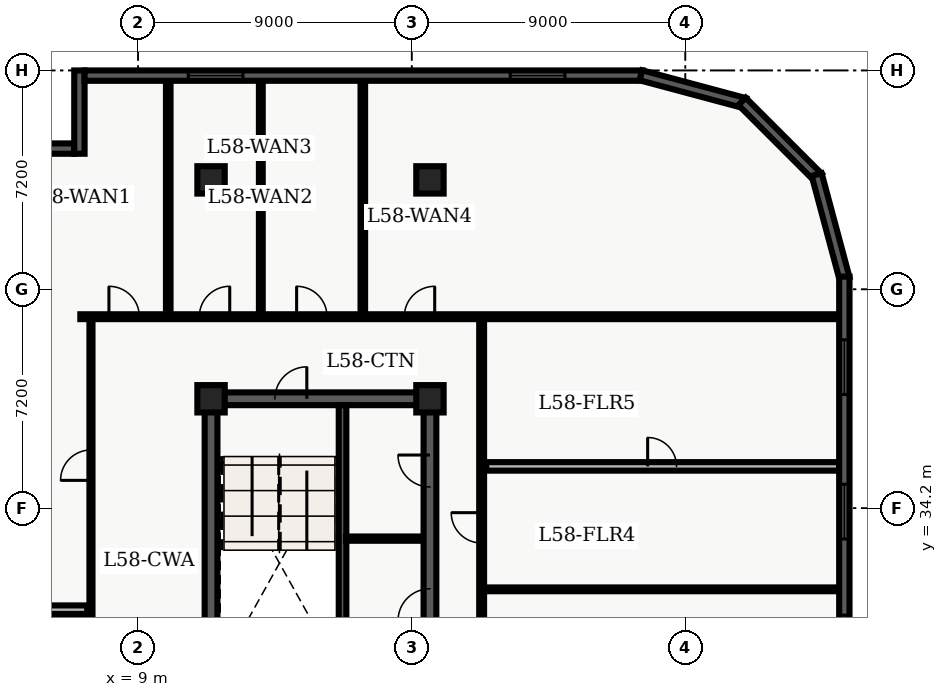
"""IFC4 building model, lengths in metres.
Left out: names, types, materials, properties, quantities, classifications, styles, units other than length and angle.
Written with IfcOpenShell. Run it as: python <this file> out.ifc"""

import sys

from ifc_helpers import new_model, entity, si_unit, converted_unit, direction, frame, origin_with_axes, origin_2d_with_axis, place, context, subcontext, project, spatial, polyline, rectangle, outline, extrude, element, fill, save


model = new_model("IFC4")
c1 = context("Model", 3, precision=1e-05, world=origin_with_axes(), true_north=direction((0.0, 1.0)))
c2 = subcontext(c1, "Body", "Model", "MODEL_VIEW")
j1 = project(units=[si_unit("LENGTHUNIT", "METRE"), converted_unit("PLANEANGLEUNIT", "DEGREE", entity("IfcPlaneAngleMeasure", 0.017), si_unit("PLANEANGLEUNIT", "RADIAN"), dimensions=[0, 0, 0, 0, 0, 0, 0])], contexts=[c1])
p1 = place(None, origin_with_axes())
s1 = spatial("IfcSite", under=j1, at=p1, CompositionType="ELEMENT")
p2 = place(p1, origin_with_axes())
s2 = spatial("IfcBuilding", under=s1, at=p2, CompositionType="ELEMENT")
p3 = place(p2, frame((0.0, 0.0, 236.4), z_axis=(0.0, 0.0, 1.0), x_axis=(1.0, 0.0, 0.0)))
s3 = spatial("IfcBuildingStorey", under=s2, at=p3, CompositionType="ELEMENT", Elevation=236.4)
p4 = place(p3, frame((11.4, 10.8, 0.0), z_axis=(0.0, 0.0, 1.0), x_axis=(0.0, 1.0, 0.0)))
e1 = element("IfcWall", 1, at=p4, inside=s3, PredefinedType="SHEAR", context=c2, shape_type="SweptSolid", body=[
    extrude(outline(polyline([(0.0, -0.21), (27.0, -0.21), (27.0, 0.21), (0.0, 0.21), (0.0, -0.21)])), origin_with_axes(), (0.0, 0.0, 1.0), 3.66),
])
p5 = place(p3, frame((11.4, 37.8, 0.0), z_axis=(0.0, 0.0, 1.0), x_axis=(1.0, 0.0, 0.0)))
e2 = element("IfcWall", 2, at=p5, inside=s3, PredefinedType="SHEAR", context=c2, shape_type="SweptSolid", body=[
    extrude(outline(polyline([(0.0, -0.21), (7.2, -0.21), (7.2, 0.21), (0.0, 0.21), (0.0, -0.21)])), origin_with_axes(), (0.0, 0.0, 1.0), 3.66),
])
p6 = place(p5, frame((2.625, 0.0, 0.0), z_axis=(0.0, 0.0, 1.0), x_axis=(1.0, 0.0, 0.0)))
e3 = element("IfcOpeningElement", 3, at=p6, cuts=e2, PredefinedType="OPENING", context=c2, shape_type="SweptSolid", body=[
    extrude(rectangle(XDim=1.05, YDim=0.44, at=origin_2d_with_axis()), origin_with_axes(), (0.0, 0.0, 1.0), 2.15),
])
p7 = place(p3, frame((18.6, 24.3, 0.0), z_axis=(0.0, 0.0, 1.0), x_axis=(0.0, 1.0, 0.0)))
e4 = element("IfcWall", 4, at=p7, inside=s3, PredefinedType="SHEAR", context=c2, shape_type="SweptSolid", body=[
    extrude(outline(polyline([(0.0, -0.21), (13.5, -0.21), (13.5, 0.21), (0.0, 0.21), (0.0, -0.21)])), origin_with_axes(), (0.0, 0.0, 1.0), 3.66),
])
p8 = place(p7, frame((6.725, 0.0, 0.0), z_axis=(0.0, 0.0, 1.0), x_axis=(1.0, 0.0, 0.0)))
e5 = element("IfcOpeningElement", 5, at=p8, cuts=e4, PredefinedType="OPENING", context=c2, shape_type="SweptSolid", body=[
    extrude(rectangle(XDim=1.05, YDim=0.44, at=origin_2d_with_axis()), origin_with_axes(), (0.0, 0.0, 1.0), 2.15),
])
p9 = place(p7, frame((11.125, 0.0, 0.0), z_axis=(0.0, 0.0, 1.0), x_axis=(1.0, 0.0, 0.0)))
e6 = element("IfcOpeningElement", 6, at=p9, cuts=e4, PredefinedType="OPENING", context=c2, shape_type="SweptSolid", body=[
    extrude(rectangle(XDim=1.05, YDim=0.44, at=origin_2d_with_axis()), origin_with_axes(), (0.0, 0.0, 1.0), 2.15),
])
p10 = place(p3, frame((15.725, 28.9, 0.0), z_axis=(0.0, 0.0, 1.0), x_axis=(0.0, 1.0, 0.0)))
e7 = element("IfcWall", 7, at=p10, inside=s3, PredefinedType="SHEAR", context=c2, shape_type="SweptSolid", body=[
    extrude(outline(polyline([(0.0, -0.125), (8.69, -0.125), (8.69, 0.125), (0.0, 0.125), (0.0, -0.125)])), origin_with_axes(), (0.0, 0.0, 1.0), 3.66),
])
for number, where, z_axis, x_axis in (
    (8, (11.4, 37.8, 0.0), (0.0, 0.0, 1.0), (1.0, 0.0, 0.0)),
    (9, (11.4, 45.0, 0.0), (0.0, 0.0, 1.0), (1.0, 0.0, 0.0)),
    (10, (18.6, 37.8, 0.0), (0.0, 0.0, 1.0), (1.0, 0.0, 0.0)),
    (11, (18.6, 45.0, 0.0), (0.0, 0.0, 1.0), (1.0, 0.0, 0.0)),
):
    element("IfcColumn", number, at=place(p3, frame(where, z_axis=z_axis, x_axis=x_axis)), inside=s3, PredefinedType="COLUMN", context=c2, shape_type="SweptSolid", body=[
        extrude(rectangle(XDim=0.9, YDim=0.9, at=origin_2d_with_axis()), origin_with_axes(), (0.0, 0.0, 1.0), 3.9),
    ])
p11 = place(p3, frame((15.84, 33.2, 0.0), z_axis=(0.0, 0.0, 1.0), x_axis=(1.0, 0.0, 0.0)))
e12 = element("IfcWall", 12, at=p11, inside=s3, PredefinedType="PARTITIONING", context=c2, shape_type="SweptSolid", body=[
    extrude(outline(polyline([(0.0, -0.07), (2.46, -0.07), (2.46, 0.07), (0.0, 0.07), (0.0, -0.07)])), origin_with_axes(), (0.0, 0.0, 1.0), 2.7),
])
p12 = place(p3, frame((7.1, 40.5, 0.0), z_axis=(0.0, 0.0, 1.0), x_axis=(1.0, 0.0, 0.0)))
e13 = element("IfcWall", 13, at=p12, inside=s3, PredefinedType="PARTITIONING", context=c2, shape_type="SweptSolid", body=[
    extrude(outline(polyline([(0.0, -0.08), (24.965, -0.08), (24.965, 0.08), (0.0, 0.08), (0.0, -0.08)])), origin_with_axes(), (0.0, 0.0, 1.0), 2.7),
])
p13 = place(p12, frame((1.441, 0.0, 0.0), z_axis=(0.0, 0.0, 1.0), x_axis=(1.0, 0.0, 0.0)))
e14 = element("IfcOpeningElement", 14, at=p13, cuts=e13, PredefinedType="OPENING", context=c2, shape_type="SweptSolid", body=[
    extrude(rectangle(XDim=1.0, YDim=0.18, at=origin_2d_with_axis()), origin_with_axes(), (0.0, 0.0, 1.0), 2.15),
])
p14 = place(p12, frame((4.415, 0.0, 0.0), z_axis=(0.0, 0.0, 1.0), x_axis=(1.0, 0.0, 0.0)))
e15 = element("IfcOpeningElement", 15, at=p14, cuts=e13, PredefinedType="OPENING", context=c2, shape_type="SweptSolid", body=[
    extrude(rectangle(XDim=1.0, YDim=0.18, at=origin_2d_with_axis()), origin_with_axes(), (0.0, 0.0, 1.0), 2.15),
])
p15 = place(p12, frame((7.614, 0.0, 0.0), z_axis=(0.0, 0.0, 1.0), x_axis=(1.0, 0.0, 0.0)))
e16 = element("IfcOpeningElement", 16, at=p15, cuts=e13, PredefinedType="OPENING", context=c2, shape_type="SweptSolid", body=[
    extrude(rectangle(XDim=1.0, YDim=0.18, at=origin_2d_with_axis()), origin_with_axes(), (0.0, 0.0, 1.0), 2.15),
])
p16 = place(p12, frame((11.156, 0.0, 0.0), z_axis=(0.0, 0.0, 1.0), x_axis=(1.0, 0.0, 0.0)))
e17 = element("IfcOpeningElement", 17, at=p16, cuts=e13, PredefinedType="OPENING", context=c2, shape_type="SweptSolid", body=[
    extrude(rectangle(XDim=1.0, YDim=0.18, at=origin_2d_with_axis()), origin_with_axes(), (0.0, 0.0, 1.0), 2.15),
])
p17 = place(p3, frame((20.3, 7.8, 0.0), z_axis=(0.0, 0.0, 1.0), x_axis=(0.0, 1.0, 0.0)))
e18 = element("IfcWall", 18, at=p17, inside=s3, PredefinedType="PARTITIONING", context=c2, shape_type="SweptSolid", body=[
    extrude(outline(polyline([(0.0, -0.08), (32.7, -0.08), (32.7, 0.08), (0.0, 0.08), (0.0, -0.08)])), origin_with_axes(), (0.0, 0.0, 1.0), 2.7),
])
p18 = place(p17, frame((14.556, 0.0, 0.0), z_axis=(0.0, 0.0, 1.0), x_axis=(1.0, 0.0, 0.0)))
e19 = element("IfcOpeningElement", 19, at=p18, cuts=e18, PredefinedType="OPENING", context=c2, shape_type="SweptSolid", body=[
    extrude(rectangle(XDim=0.9, YDim=0.18, at=origin_2d_with_axis()), origin_with_axes(), (0.0, 0.0, 1.0), 2.15),
])
p19 = place(p17, frame((18.551, 0.0, 0.0), z_axis=(0.0, 0.0, 1.0), x_axis=(1.0, 0.0, 0.0)))
e20 = element("IfcOpeningElement", 20, at=p19, cuts=e18, PredefinedType="OPENING", context=c2, shape_type="SweptSolid", body=[
    extrude(rectangle(XDim=1.0, YDim=0.18, at=origin_2d_with_axis()), origin_with_axes(), (0.0, 0.0, 1.0), 2.15),
])
p20 = place(p17, frame((22.226, 0.0, 0.0), z_axis=(0.0, 0.0, 1.0), x_axis=(1.0, 0.0, 0.0)))
e21 = element("IfcOpeningElement", 21, at=p20, cuts=e18, PredefinedType="OPENING", context=c2, shape_type="SweptSolid", body=[
    extrude(rectangle(XDim=1.0, YDim=0.18, at=origin_2d_with_axis()), origin_with_axes(), (0.0, 0.0, 1.0), 2.15),
])
p21 = place(p17, frame((25.754, 0.0, 0.0), z_axis=(0.0, 0.0, 1.0), x_axis=(1.0, 0.0, 0.0)))
e22 = element("IfcOpeningElement", 22, at=p21, cuts=e18, PredefinedType="OPENING", context=c2, shape_type="SweptSolid", body=[
    extrude(rectangle(XDim=1.0, YDim=0.18, at=origin_2d_with_axis()), origin_with_axes(), (0.0, 0.0, 1.0), 2.15),
])
p22 = place(p17, frame((5.775, 0.0, 0.0), z_axis=(0.0, 0.0, 1.0), x_axis=(1.0, 0.0, 0.0)))
e23 = element("IfcOpeningElement", 23, at=p22, cuts=e18, PredefinedType="OPENING", context=c2, shape_type="SweptSolid", body=[
    extrude(rectangle(XDim=1.05, YDim=0.18, at=origin_2d_with_axis()), origin_with_axes(), (0.0, 0.0, 1.0), 2.15),
])
p23 = place(p3, frame((7.45, 7.8, 0.0), z_axis=(0.0, 0.0, 1.0), x_axis=(0.0, 1.0, 0.0)))
e24 = element("IfcWall", 24, at=p23, inside=s3, PredefinedType="PARTITIONING", context=c2, shape_type="SweptSolid", body=[
    extrude(outline(polyline([(0.0, -0.05), (32.7, -0.05), (32.7, 0.05), (0.0, 0.05), (0.0, -0.05)])), origin_with_axes(), (0.0, 0.0, 1.0), 2.7),
])
p24 = place(p23, frame((2.296, 0.0, 0.0), z_axis=(0.0, 0.0, 1.0), x_axis=(1.0, 0.0, 0.0)))
e25 = element("IfcOpeningElement", 25, at=p24, cuts=e24, PredefinedType="OPENING", context=c2, shape_type="SweptSolid", body=[
    extrude(rectangle(XDim=1.0, YDim=0.12, at=origin_2d_with_axis()), origin_with_axes(), (0.0, 0.0, 1.0), 2.15),
])
p25 = place(p23, frame((6.989, 0.0, 0.0), z_axis=(0.0, 0.0, 1.0), x_axis=(1.0, 0.0, 0.0)))
e26 = element("IfcOpeningElement", 26, at=p25, cuts=e24, PredefinedType="OPENING", context=c2, shape_type="SweptSolid", body=[
    extrude(rectangle(XDim=1.0, YDim=0.12, at=origin_2d_with_axis()), origin_with_axes(), (0.0, 0.0, 1.0), 2.15),
])
p26 = place(p23, frame((12.56, 0.0, 0.0), z_axis=(0.0, 0.0, 1.0), x_axis=(1.0, 0.0, 0.0)))
e27 = element("IfcOpeningElement", 27, at=p26, cuts=e24, PredefinedType="OPENING", context=c2, shape_type="SweptSolid", body=[
    extrude(rectangle(XDim=1.0, YDim=0.12, at=origin_2d_with_axis()), origin_with_axes(), (0.0, 0.0, 1.0), 2.15),
])
p27 = place(p23, frame((19.334, 0.0, 0.0), z_axis=(0.0, 0.0, 1.0), x_axis=(1.0, 0.0, 0.0)))
e28 = element("IfcOpeningElement", 28, at=p27, cuts=e24, PredefinedType="OPENING", context=c2, shape_type="SweptSolid", body=[
    extrude(rectangle(XDim=1.0, YDim=0.12, at=origin_2d_with_axis()), origin_with_axes(), (0.0, 0.0, 1.0), 2.15),
])
p28 = place(p23, frame((27.817, 0.0, 0.0), z_axis=(0.0, 0.0, 1.0), x_axis=(1.0, 0.0, 0.0)))
e29 = element("IfcOpeningElement", 29, at=p28, cuts=e24, PredefinedType="OPENING", context=c2, shape_type="SweptSolid", body=[
    extrude(rectangle(XDim=1.0, YDim=0.12, at=origin_2d_with_axis()), origin_with_axes(), (0.0, 0.0, 1.0), 2.15),
])
p29 = place(p3, frame((4.835, 30.863, 0.0), z_axis=(0.0, 0.0, 1.0), x_axis=(1.0, 0.0, 0.0)))
e30 = element("IfcWall", 30, at=p29, inside=s3, PredefinedType="PARTITIONING", context=c2, shape_type="SweptSolid", body=[
    extrude(outline(polyline([(0.0, -0.14), (2.495, -0.14), (2.495, 0.14), (0.0, 0.14), (0.0, -0.14)])), origin_with_axes(), (0.0, 0.0, 1.0), 2.7),
])
p30 = place(p3, frame((9.992, 40.6, 0.0), z_axis=(0.0, 0.0, 1.0), x_axis=(0.0, 1.0, 0.0)))
e31 = element("IfcWall", 31, at=p30, inside=s3, PredefinedType="PARTITIONING", context=c2, shape_type="SweptSolid", body=[
    extrude(outline(polyline([(0.0, -0.075), (7.665, -0.075), (7.665, 0.075), (0.0, 0.075), (0.0, -0.075)])), origin_with_axes(), (0.0, 0.0, 1.0), 2.7),
])
p31 = place(p3, frame((13.037, 40.6, 0.0), z_axis=(0.0, 0.0, 1.0), x_axis=(0.0, 1.0, 0.0)))
e32 = element("IfcWall", 32, at=p31, inside=s3, PredefinedType="PARTITIONING", context=c2, shape_type="SweptSolid", body=[
    extrude(outline(polyline([(0.0, -0.062), (7.665, -0.062), (7.665, 0.062), (0.0, 0.062), (0.0, -0.062)])), origin_with_axes(), (0.0, 0.0, 1.0), 2.7),
])
p32 = place(p3, frame((16.392, 40.6, 0.0), z_axis=(0.0, 0.0, 1.0), x_axis=(0.0, 1.0, 0.0)))
e33 = element("IfcWall", 33, at=p32, inside=s3, PredefinedType="PARTITIONING", context=c2, shape_type="SweptSolid", body=[
    extrude(outline(polyline([(0.0, -0.075), (7.665, -0.075), (7.665, 0.075), (0.0, 0.075), (0.0, -0.075)])), origin_with_axes(), (0.0, 0.0, 1.0), 2.7),
])
p33 = place(p3, frame((20.45, 31.532, 0.0), z_axis=(0.0, 0.0, 1.0), x_axis=(1.0, 0.0, 0.0)))
e34 = element("IfcWall", 34, at=p33, inside=s3, PredefinedType="PARTITIONING", context=c2, shape_type="SweptSolid", body=[
    extrude(outline(polyline([(0.0, -0.062), (11.615, -0.062), (11.615, 0.062), (0.0, 0.062), (0.0, -0.062)])), origin_with_axes(), (0.0, 0.0, 1.0), 2.7),
])
p34 = place(p3, frame((20.45, 35.576, 0.0), z_axis=(0.0, 0.0, 1.0), x_axis=(1.0, 0.0, 0.0)))
e35 = element("IfcWall", 35, at=p34, inside=s3, PredefinedType="PARTITIONING", context=c2, shape_type="SweptSolid", body=[
    extrude(outline(polyline([(0.0, -0.14), (11.615, -0.14), (11.615, 0.14), (0.0, 0.14), (0.0, -0.14)])), origin_with_axes(), (0.0, 0.0, 1.0), 2.7),
])
p35 = place(p34, frame((5.785, 0.0, 0.0), z_axis=(0.0, 0.0, 1.0), x_axis=(1.0, 0.0, 0.0)))
e36 = element("IfcOpeningElement", 36, at=p35, cuts=e35, PredefinedType="OPENING", context=c2, shape_type="SweptSolid", body=[
    extrude(rectangle(XDim=0.95, YDim=0.3, at=origin_2d_with_axis()), origin_with_axes(), (0.0, 0.0, 1.0), 2.15),
])
p36 = place(p3, frame((4.84, 46.03, 0.0), z_axis=(0.0, 0.0, 1.0), x_axis=(1.0, 0.0, 0.0)))
e37 = element("IfcWall", 37, at=p36, inside=s3, PredefinedType="SOLIDWALL", context=c2, shape_type="SweptSolid", body=[
    extrude(outline(polyline([(0.0, -0.17), (2.06, -0.17), (2.06, 0.17), (0.0, 0.17), (0.0, -0.17)])), origin_with_axes(), (0.0, 0.0, 1.0), 3.66),
])
p37 = place(p3, frame((7.07, 45.86, 0.0), z_axis=(0.0, 0.0, 1.0), x_axis=(0.0, 1.0, 0.0)))
e38 = element("IfcWall", 38, at=p37, inside=s3, PredefinedType="SOLIDWALL", context=c2, shape_type="SweptSolid", body=[
    extrude(outline(polyline([(0.0, -0.17), (2.74, -0.17), (2.74, 0.17), (0.0, 0.17), (0.0, -0.17)])), origin_with_axes(), (0.0, 0.0, 1.0), 3.66),
])
p38 = place(p3, frame((7.24, 48.43, 0.0), z_axis=(0.0, 0.0, 1.0), x_axis=(1.0, 0.0, 0.0)))
e39 = element("IfcWall", 39, at=p38, inside=s3, PredefinedType="SOLIDWALL", context=c2, shape_type="SweptSolid", body=[
    extrude(outline(polyline([(0.0, -0.17), (18.36, -0.17), (18.36, 0.17), (0.0, 0.17), (0.0, -0.17)])), origin_with_axes(), (0.0, 0.0, 1.0), 3.66),
])
p39 = place(p38, frame((4.31, 0.0, 0.45), z_axis=(0.0, 0.0, 1.0), x_axis=(1.0, 0.0, 0.0)))
e40 = element("IfcOpeningElement", 40, at=p39, cuts=e39, PredefinedType="OPENING", context=c2, shape_type="SweptSolid", body=[
    extrude(rectangle(XDim=1.8, YDim=0.36, at=origin_2d_with_axis()), origin_with_axes(), (0.0, 0.0, 1.0), 2.1),
])
p40 = place(p38, frame((14.9, 0.0, 0.45), z_axis=(0.0, 0.0, 1.0), x_axis=(1.0, 0.0, 0.0)))
e41 = element("IfcOpeningElement", 41, at=p40, cuts=e39, PredefinedType="OPENING", context=c2, shape_type="SweptSolid", body=[
    extrude(rectangle(XDim=1.8, YDim=0.36, at=origin_2d_with_axis()), origin_with_axes(), (0.0, 0.0, 1.0), 2.1),
])
p41 = place(p3, frame((25.537, 48.441, 0.0), z_axis=(0.0, 0.0, 1.0), x_axis=(0.965934, -0.258788, 0.0)))
e42 = element("IfcWall", 42, at=p41, inside=s3, PredefinedType="SOLIDWALL", context=c2, shape_type="SweptSolid", body=[
    extrude(outline(polyline([(0.0, -0.17), (3.54, -0.17), (3.54, 0.17), (0.0, 0.17), (0.0, -0.17)])), origin_with_axes(), (0.0, 0.0, 1.0), 3.66),
])
p42 = place(p3, frame((28.866, 47.583, 0.0), z_axis=(0.0, 0.0, 1.0), x_axis=(0.707107, -0.707107, 0.0)))
e43 = element("IfcWall", 43, at=p42, inside=s3, PredefinedType="SOLIDWALL", context=c2, shape_type="SweptSolid", body=[
    extrude(outline(polyline([(0.0, -0.17), (3.54, -0.17), (3.54, 0.17), (0.0, 0.17), (0.0, -0.17)])), origin_with_axes(), (0.0, 0.0, 1.0), 3.66),
])
p43 = place(p3, frame((31.32, 45.175, 0.0), z_axis=(0.0, 0.0, 1.0), x_axis=(0.258788, -0.965934, 0.0)))
e44 = element("IfcWall", 44, at=p43, inside=s3, PredefinedType="SOLIDWALL", context=c2, shape_type="SweptSolid", body=[
    extrude(outline(polyline([(0.0, -0.17), (3.54, -0.17), (3.54, 0.17), (0.0, 0.17), (0.0, -0.17)])), origin_with_axes(), (0.0, 0.0, 1.0), 3.66),
])
p44 = place(p3, frame((32.23, 41.82, 0.0), z_axis=(0.0, 0.0, 1.0), x_axis=(0.0, -1.0, 0.0)))
e45 = element("IfcWall", 45, at=p44, inside=s3, PredefinedType="SOLIDWALL", context=c2, shape_type="SweptSolid", body=[
    extrude(outline(polyline([(0.0, -0.17), (20.22, -0.17), (20.22, 0.17), (0.0, 0.17), (0.0, -0.17)])), origin_with_axes(), (0.0, 0.0, 1.0), 3.66),
])
p45 = place(p44, frame((2.978, 0.0, 0.45), z_axis=(0.0, 0.0, 1.0), x_axis=(1.0, 0.0, 0.0)))
e46 = element("IfcOpeningElement", 46, at=p45, cuts=e45, PredefinedType="OPENING", context=c2, shape_type="SweptSolid", body=[
    extrude(rectangle(XDim=1.8, YDim=0.36, at=origin_2d_with_axis()), origin_with_axes(), (0.0, 0.0, 1.0), 2.1),
])
p46 = place(p44, frame((7.732, 0.0, 0.45), z_axis=(0.0, 0.0, 1.0), x_axis=(1.0, 0.0, 0.0)))
e47 = element("IfcOpeningElement", 47, at=p46, cuts=e45, PredefinedType="OPENING", context=c2, shape_type="SweptSolid", body=[
    extrude(rectangle(XDim=1.8, YDim=0.36, at=origin_2d_with_axis()), origin_with_axes(), (0.0, 0.0, 1.0), 2.1),
])
p47 = place(p44, frame((12.037, 0.0, 0.45), z_axis=(0.0, 0.0, 1.0), x_axis=(1.0, 0.0, 0.0)))
e48 = element("IfcOpeningElement", 48, at=p47, cuts=e45, PredefinedType="OPENING", context=c2, shape_type="SweptSolid", body=[
    extrude(rectangle(XDim=1.8, YDim=0.36, at=origin_2d_with_axis()), origin_with_axes(), (0.0, 0.0, 1.0), 2.1),
])
p48 = place(p5, frame((2.625, 0.0, 0.0), z_axis=(0.0, 0.0, 1.0), x_axis=(1.0, 0.0, 0.0)))
e49 = element("IfcDoor", 49, at=p48, inside=s3, OperationType="SINGLE_SWING_RIGHT", PredefinedType="DOOR", context=c2, shape_type="SweptSolid", body=[
    extrude(rectangle(XDim=1.05, YDim=0.09, at=origin_2d_with_axis()), origin_with_axes(), (0.0, 0.0, 1.0), 2.15),
])
fill(e3, e49)
p49 = place(p7, frame((6.725, 0.0, 0.0), z_axis=(0.0, 0.0, 1.0), x_axis=(1.0, 0.0, 0.0)))
e50 = element("IfcDoor", 50, at=p49, inside=s3, OperationType="SINGLE_SWING_LEFT", PredefinedType="DOOR", context=c2, shape_type="SweptSolid", body=[
    extrude(rectangle(XDim=1.05, YDim=0.09, at=origin_2d_with_axis()), origin_with_axes(), (0.0, 0.0, 1.0), 2.15),
])
fill(e5, e50)
p50 = place(p7, frame((11.125, 0.0, 0.0), z_axis=(0.0, 0.0, 1.0), x_axis=(1.0, 0.0, 0.0)))
e51 = element("IfcDoor", 51, at=p50, inside=s3, OperationType="SINGLE_SWING_RIGHT", PredefinedType="DOOR", context=c2, shape_type="SweptSolid", body=[
    extrude(rectangle(XDim=1.05, YDim=0.09, at=origin_2d_with_axis()), origin_with_axes(), (0.0, 0.0, 1.0), 2.15),
])
fill(e6, e51)
p51 = place(p23, frame((27.817, 0.0, 0.0), z_axis=(0.0, 0.0, 1.0), x_axis=(1.0, 0.0, 0.0)))
e52 = element("IfcDoor", 52, at=p51, inside=s3, OperationType="SINGLE_SWING_LEFT", PredefinedType="DOOR", context=c2, shape_type="SweptSolid", body=[
    extrude(rectangle(XDim=1.0, YDim=0.06, at=origin_2d_with_axis()), origin_with_axes(), (0.0, 0.0, 1.0), 2.15),
])
fill(e29, e52)
p52 = place(p12, frame((1.441, 0.0, 0.0), z_axis=(0.0, 0.0, 1.0), x_axis=(1.0, 0.0, 0.0)))
e53 = element("IfcDoor", 53, at=p52, inside=s3, OperationType="SINGLE_SWING_LEFT", PredefinedType="DOOR", context=c2, shape_type="SweptSolid", body=[
    extrude(rectangle(XDim=1.0, YDim=0.09, at=origin_2d_with_axis()), origin_with_axes(), (0.0, 0.0, 1.0), 2.15),
])
fill(e14, e53)
p53 = place(p12, frame((4.415, 0.0, 0.0), z_axis=(0.0, 0.0, 1.0), x_axis=(1.0, 0.0, 0.0)))
e54 = element("IfcDoor", 54, at=p53, inside=s3, OperationType="SINGLE_SWING_RIGHT", PredefinedType="DOOR", context=c2, shape_type="SweptSolid", body=[
    extrude(rectangle(XDim=1.0, YDim=0.09, at=origin_2d_with_axis()), origin_with_axes(), (0.0, 0.0, 1.0), 2.15),
])
fill(e15, e54)
p54 = place(p12, frame((7.614, 0.0, 0.0), z_axis=(0.0, 0.0, 1.0), x_axis=(1.0, 0.0, 0.0)))
e55 = element("IfcDoor", 55, at=p54, inside=s3, OperationType="SINGLE_SWING_LEFT", PredefinedType="DOOR", context=c2, shape_type="SweptSolid", body=[
    extrude(rectangle(XDim=1.0, YDim=0.09, at=origin_2d_with_axis()), origin_with_axes(), (0.0, 0.0, 1.0), 2.15),
])
fill(e16, e55)
p55 = place(p12, frame((11.156, 0.0, 0.0), z_axis=(0.0, 0.0, 1.0), x_axis=(1.0, 0.0, 0.0)))
e56 = element("IfcDoor", 56, at=p55, inside=s3, OperationType="SINGLE_SWING_RIGHT", PredefinedType="DOOR", context=c2, shape_type="SweptSolid", body=[
    extrude(rectangle(XDim=1.0, YDim=0.09, at=origin_2d_with_axis()), origin_with_axes(), (0.0, 0.0, 1.0), 2.15),
])
fill(e17, e56)
p56 = place(p17, frame((25.754, 0.0, 0.0), z_axis=(0.0, 0.0, 1.0), x_axis=(1.0, 0.0, 0.0)))
e57 = element("IfcDoor", 57, at=p56, inside=s3, OperationType="SINGLE_SWING_RIGHT", PredefinedType="DOOR", context=c2, shape_type="SweptSolid", body=[
    extrude(rectangle(XDim=1.0, YDim=0.09, at=origin_2d_with_axis()), origin_with_axes(), (0.0, 0.0, 1.0), 2.15),
])
fill(e22, e57)
p57 = place(p34, frame((5.785, 0.0, 0.0), z_axis=(0.0, 0.0, 1.0), x_axis=(1.0, 0.0, 0.0)))
e58 = element("IfcDoor", 58, at=p57, inside=s3, OperationType="SINGLE_SWING_LEFT", PredefinedType="DOOR", context=c2, shape_type="SweptSolid", body=[
    extrude(rectangle(XDim=0.95, YDim=0.09, at=origin_2d_with_axis()), origin_with_axes(), (0.0, 0.0, 1.0), 2.15),
])
fill(e36, e58)
p58 = place(p38, frame((4.31, 0.0, 0.45), z_axis=(0.0, 0.0, 1.0), x_axis=(1.0, 0.0, 0.0)))
e59 = element("IfcWindow", 59, at=p58, inside=s3, PredefinedType="WINDOW", context=c2, shape_type="SweptSolid", body=[
    extrude(rectangle(XDim=1.8, YDim=0.09, at=origin_2d_with_axis()), origin_with_axes(), (0.0, 0.0, 1.0), 2.1),
])
fill(e40, e59)
p59 = place(p38, frame((14.9, 0.0, 0.45), z_axis=(0.0, 0.0, 1.0), x_axis=(1.0, 0.0, 0.0)))
e60 = element("IfcWindow", 60, at=p59, inside=s3, PredefinedType="WINDOW", context=c2, shape_type="SweptSolid", body=[
    extrude(rectangle(XDim=1.8, YDim=0.09, at=origin_2d_with_axis()), origin_with_axes(), (0.0, 0.0, 1.0), 2.1),
])
fill(e41, e60)
p60 = place(p44, frame((2.978, 0.0, 0.45), z_axis=(0.0, 0.0, 1.0), x_axis=(1.0, 0.0, 0.0)))
e61 = element("IfcWindow", 61, at=p60, inside=s3, PredefinedType="WINDOW", context=c2, shape_type="SweptSolid", body=[
    extrude(rectangle(XDim=1.8, YDim=0.09, at=origin_2d_with_axis()), origin_with_axes(), (0.0, 0.0, 1.0), 2.1),
])
fill(e46, e61)
p61 = place(p44, frame((7.732, 0.0, 0.45), z_axis=(0.0, 0.0, 1.0), x_axis=(1.0, 0.0, 0.0)))
e62 = element("IfcWindow", 62, at=p61, inside=s3, PredefinedType="WINDOW", context=c2, shape_type="SweptSolid", body=[
    extrude(rectangle(XDim=1.8, YDim=0.09, at=origin_2d_with_axis()), origin_with_axes(), (0.0, 0.0, 1.0), 2.1),
])
fill(e47, e62)
p62 = place(p44, frame((12.037, 0.0, 0.45), z_axis=(0.0, 0.0, 1.0), x_axis=(1.0, 0.0, 0.0)))
e63 = element("IfcWindow", 63, at=p62, inside=s3, PredefinedType="WINDOW", context=c2, shape_type="SweptSolid", body=[
    extrude(rectangle(XDim=1.8, YDim=0.09, at=origin_2d_with_axis()), origin_with_axes(), (0.0, 0.0, 1.0), 2.1),
])
fill(e48, e63)
save(model, sys.argv[1])
